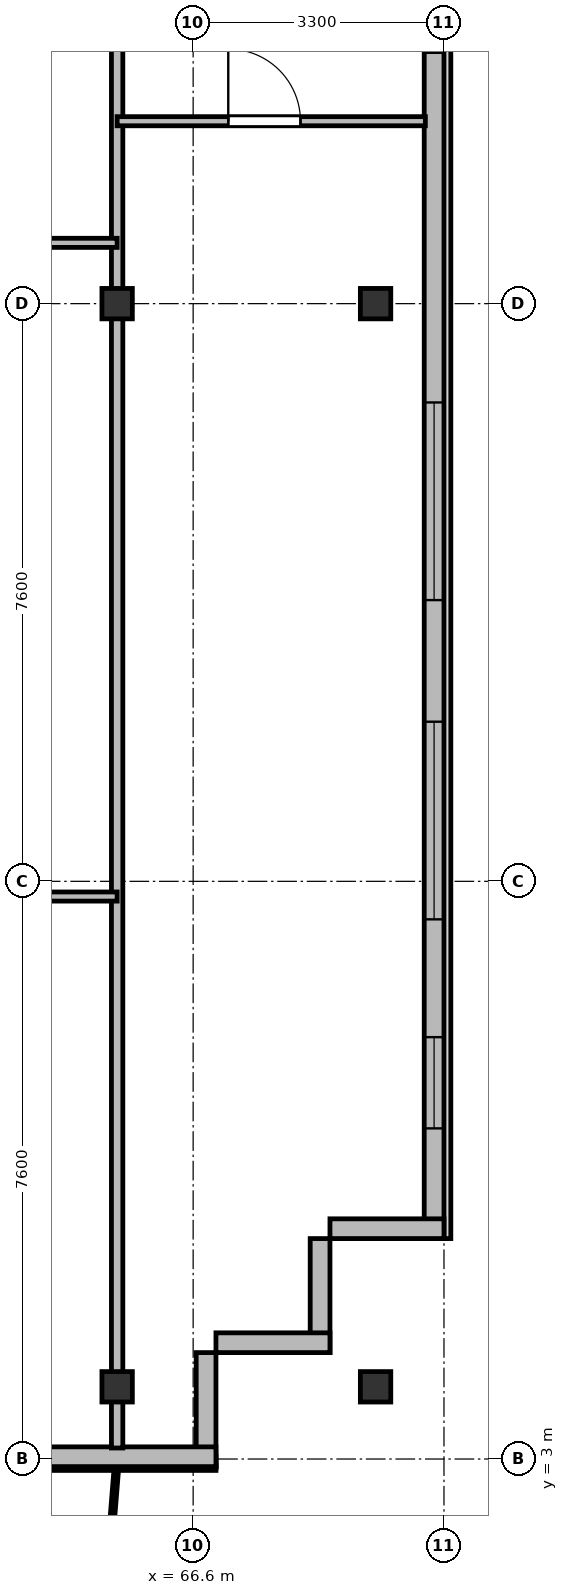
"""IFC4 building model, lengths in metres.
Left out: names, types, materials, properties, quantities, classifications, styles, units other than length and angle.
Written with IfcOpenShell. Run it as: python <this file> out.ifc"""

import sys

from ifc_helpers import new_model, si_unit, direction, frame, frame_2d, origin, origin_2d, place, context, subcontext, project, spatial, rectangle, i_section, extrude, source, transform, mapped, element, fill, save


model = new_model("IFC4")
c1 = context("Model", 3, precision=1e-05, world=origin(), true_north=direction((0.0, 1.0)))
c2 = subcontext(c1, "Body", "Model", "MODEL_VIEW")
j1 = project(units=[si_unit("LENGTHUNIT", "METRE"), si_unit("PLANEANGLEUNIT", "RADIAN")], contexts=[c1])
p1 = place(None, origin())
s1 = spatial("IfcSite", under=j1, at=p1, CompositionType="ELEMENT")
p2 = place(p1, origin())
s2 = spatial("IfcBuilding", under=s1, at=p2, CompositionType="ELEMENT")
p3 = place(p2, frame((0.0, 0.0, 110.5)))
s3 = spatial("IfcBuildingStorey", under=s2, at=p3, CompositionType="ELEMENT", Elevation=110.5)
m1 = source(origin(), c2, "Body", "SweptSolid", [
    extrude(i_section(OverallWidth=0.4, OverallDepth=0.4, WebThickness=0.022, FlangeThickness=0.035, at=origin_2d()), origin(), (0.0, 0.0, 1.0), 3.6),
])
for number, where, z_axis, x_axis in (
    (1, (65.6, 3.95, 0.0), (0.0, 0.0, 1.0), (1.0, 0.0, 0.0)),
    (2, (65.6, 18.2, 0.0), (0.0, 0.0, 1.0), (1.0, 0.0, 0.0)),
    (3, (69.0, 3.95, 0.0), (0.0, 0.0, 1.0), (1.0, 0.0, 0.0)),
    (4, (69.0, 18.2, 0.0), (0.0, 0.0, 1.0), (1.0, 0.0, 0.0)),
):
    element("IfcColumn", number, at=place(p3, frame(where, z_axis=z_axis, x_axis=x_axis)), inside=s3, PredefinedType="COLUMN", context=c2, shape_type="MappedRepresentation", body=[
        mapped(m1, transform((0.0, 0.0, 0.0), x_axis=(1.0, 0.0, 0.0), y_axis=(0.0, 1.0, 0.0), z_axis=(0.0, 0.0, 1.0), scale=1.0)),
    ])
p4 = place(p3, frame((69.77, 45.5, 0.0), z_axis=(0.0, 0.0, 1.0), x_axis=(0.0, -1.0, 0.0)))
e5 = element("IfcWall", 5, at=p4, inside=s3, PredefinedType="SOLIDWALL", context=c2, shape_type="SweptSolid", body=[
    extrude(rectangle(XDim=39.6, YDim=0.26, at=frame_2d((19.8, 0.0))), origin(), (0.0, 0.0, 1.0), 3.34),
])
p5 = place(p4, frame((36.95, 0.0, 0.92)))
e6 = element("IfcOpeningElement", 6, at=p5, cuts=e5, PredefinedType="OPENING", context=c2, shape_type="SweptSolid", body=[
    extrude(rectangle(XDim=1.2, YDim=1.65, at=frame_2d((0.6, 0.825))), frame((0.0, 0.14, 0.0), z_axis=(0.0, -1.0, 0.0), x_axis=(1.0, 0.0, 0.0)), (0.0, 0.0, 1.0), 0.28),
])
p6 = place(p4, frame((32.8, 0.0, 0.92)))
e7 = element("IfcOpeningElement", 7, at=p6, cuts=e5, PredefinedType="OPENING", context=c2, shape_type="SweptSolid", body=[
    extrude(rectangle(XDim=2.6, YDim=1.9, at=frame_2d((1.3, 0.95))), frame((0.0, 0.14, 0.0), z_axis=(0.0, -1.0, 0.0), x_axis=(1.0, 0.0, 0.0)), (0.0, 0.0, 1.0), 0.28),
])
p7 = place(p4, frame((28.6, 0.0, 0.92)))
e8 = element("IfcOpeningElement", 8, at=p7, cuts=e5, PredefinedType="OPENING", context=c2, shape_type="SweptSolid", body=[
    extrude(rectangle(XDim=2.6, YDim=1.9, at=frame_2d((1.3, 0.95))), frame((0.0, 0.14, 0.0), z_axis=(0.0, -1.0, 0.0), x_axis=(1.0, 0.0, 0.0)), (0.0, 0.0, 1.0), 0.28),
])
p8 = place(p4, frame((21.4, 0.0, 0.92)))
e9 = element("IfcOpeningElement", 9, at=p8, cuts=e5, PredefinedType="OPENING", context=c2, shape_type="SweptSolid", body=[
    extrude(rectangle(XDim=2.6, YDim=1.9, at=frame_2d((1.3, 0.95))), frame((0.0, 0.14, 0.0), z_axis=(0.0, -1.0, 0.0), x_axis=(1.0, 0.0, 0.0)), (0.0, 0.0, 1.0), 0.28),
])
p9 = place(p4, frame((7.4, 0.0, 0.92)))
e10 = element("IfcOpeningElement", 10, at=p9, cuts=e5, PredefinedType="OPENING", context=c2, shape_type="SweptSolid", body=[
    extrude(rectangle(XDim=2.6, YDim=1.9, at=frame_2d((1.3, 0.95))), frame((0.0, 0.14, 0.0), z_axis=(0.0, -1.0, 0.0), x_axis=(1.0, 0.0, 0.0)), (0.0, 0.0, 1.0), 0.28),
])
p10 = place(p4, frame((4.5, 0.0, 0.92)))
e11 = element("IfcOpeningElement", 11, at=p10, cuts=e5, PredefinedType="OPENING", context=c2, shape_type="SweptSolid", body=[
    extrude(rectangle(XDim=1.2, YDim=1.65, at=frame_2d((0.6, 0.825))), frame((0.0, 0.14, 0.0), z_axis=(0.0, -1.0, 0.0), x_axis=(1.0, 0.0, 0.0)), (0.0, 0.0, 1.0), 0.28),
])
p11 = place(p4, frame((1.15, 0.0, 0.92)))
e12 = element("IfcOpeningElement", 12, at=p11, cuts=e5, PredefinedType="OPENING", context=c2, shape_type="SweptSolid", body=[
    extrude(rectangle(XDim=1.2, YDim=1.65, at=frame_2d((0.6, 0.825))), frame((0.0, 0.14, 0.0), z_axis=(0.0, -1.0, 0.0), x_axis=(1.0, 0.0, 0.0)), (0.0, 0.0, 1.0), 0.28),
])
p12 = place(p3, frame((69.9, 6.03, 0.0), z_axis=(0.0, 0.0, 1.0), x_axis=(-1.0, 0.0, 0.0)))
e13 = element("IfcWall", 13, at=p12, inside=s3, PredefinedType="SOLIDWALL", context=c2, shape_type="SweptSolid", body=[
    extrude(rectangle(XDim=1.5, YDim=0.26, at=frame_2d((0.75, 0.0))), origin(), (0.0, 0.0, 1.0), 2.84),
])
for number, where, z_axis, x_axis in (
    (14, (68.27, 5.9, 0.0), (0.0, 0.0, 1.0), (0.0, -1.0, 0.0)),
    (15, (68.4, 4.53, 0.0), (0.0, 0.0, 1.0), (-1.0, 0.0, 0.0)),
):
    element("IfcWall", number, at=place(p3, frame(where, z_axis=z_axis, x_axis=x_axis)), inside=s3, PredefinedType="SOLIDWALL", context=c2, shape_type="SweptSolid", body=[
        extrude(rectangle(XDim=1.5, YDim=0.26, at=frame_2d((0.75, 0.0))), origin(), (0.0, 0.0, 1.0), 3.34),
    ])
p13 = place(p3, frame((66.77, 4.4, 0.0), z_axis=(0.0, 0.0, 1.0), x_axis=(0.0, -1.0, 0.0)))
e16 = element("IfcWall", 16, at=p13, inside=s3, PredefinedType="SOLIDWALL", context=c2, shape_type="SweptSolid", body=[
    extrude(rectangle(XDim=1.5, YDim=0.26, at=frame_2d((0.75, 0.0))), origin(), (0.0, 0.0, 1.0), 2.752),
])
p14 = place(p3, frame((66.9, 3.03, 0.0), z_axis=(0.0, 0.0, 1.0), x_axis=(-1.0, 0.0, 0.0)))
e17 = element("IfcWall", 17, at=p14, inside=s3, PredefinedType="SOLIDWALL", context=c2, shape_type="SweptSolid", body=[
    extrude(rectangle(XDim=59.4, YDim=0.26, at=frame_2d((29.7, 0.0))), origin(), (0.0, 0.0, 1.0), 3.34),
])
p15 = place(p14, frame((2.175, 0.0, 0.9)))
e18 = element("IfcOpeningElement", 18, at=p15, cuts=e17, PredefinedType="OPENING", context=c2, shape_type="SweptSolid", body=[
    extrude(rectangle(XDim=1.65, YDim=1.85, at=frame_2d((0.825, 0.925))), frame((0.0, 0.14, 0.0), z_axis=(0.0, -1.0, 0.0), x_axis=(1.0, 0.0, 0.0)), (0.0, 0.0, 1.0), 0.28),
])
p16 = place(p14, frame((5.5, 0.0, 0.9)))
e19 = element("IfcOpeningElement", 19, at=p16, cuts=e17, PredefinedType="OPENING", context=c2, shape_type="SweptSolid", body=[
    extrude(rectangle(XDim=1.8, YDim=1.8, at=frame_2d((0.9, 0.9))), frame((0.0, 0.14, 0.0), z_axis=(0.0, -1.0, 0.0), x_axis=(1.0, 0.0, 0.0)), (0.0, 0.0, 1.0), 0.28),
])
p17 = place(p14, frame((9.213, 0.0, 0.0)))
e20 = element("IfcOpeningElement", 20, at=p17, cuts=e17, PredefinedType="OPENING", context=c2, shape_type="SweptSolid", body=[
    extrude(rectangle(XDim=1.2, YDim=2.2, at=frame_2d((0.6, 1.1))), frame((0.0, 0.14, 0.0), z_axis=(0.0, -1.0, 0.0), x_axis=(1.0, 0.0, 0.0)), (0.0, 0.0, 1.0), 0.28),
])
p18 = place(p14, frame((13.15, 0.0, 0.9)))
e21 = element("IfcOpeningElement", 21, at=p18, cuts=e17, PredefinedType="OPENING", context=c2, shape_type="SweptSolid", body=[
    extrude(rectangle(XDim=1.5, YDim=1.75, at=frame_2d((0.75, 0.875))), frame((0.0, 0.14, 0.0), z_axis=(0.0, -1.0, 0.0), x_axis=(1.0, 0.0, 0.0)), (0.0, 0.0, 1.0), 0.28),
])
p19 = place(p14, frame((16.7, 0.0, 0.9)))
e22 = element("IfcOpeningElement", 22, at=p19, cuts=e17, PredefinedType="OPENING", context=c2, shape_type="SweptSolid", body=[
    extrude(rectangle(XDim=2.0, YDim=1.95, at=frame_2d((1.0, 0.975))), frame((0.0, 0.14, 0.0), z_axis=(0.0, -1.0, 0.0), x_axis=(1.0, 0.0, 0.0)), (0.0, 0.0, 1.0), 0.28),
])
p20 = place(p14, frame((20.475, 0.0, 0.9)))
e23 = element("IfcOpeningElement", 23, at=p20, cuts=e17, PredefinedType="OPENING", context=c2, shape_type="SweptSolid", body=[
    extrude(rectangle(XDim=1.65, YDim=1.85, at=frame_2d((0.825, 0.925))), frame((0.0, 0.14, 0.0), z_axis=(0.0, -1.0, 0.0), x_axis=(1.0, 0.0, 0.0)), (0.0, 0.0, 1.0), 0.28),
])
p21 = place(p14, frame((25.5, 0.0, 0.9)))
e24 = element("IfcOpeningElement", 24, at=p21, cuts=e17, PredefinedType="OPENING", context=c2, shape_type="SweptSolid", body=[
    extrude(rectangle(XDim=1.8, YDim=1.8, at=frame_2d((0.9, 0.9))), frame((0.0, 0.14, 0.0), z_axis=(0.0, -1.0, 0.0), x_axis=(1.0, 0.0, 0.0)), (0.0, 0.0, 1.0), 0.28),
])
p22 = place(p14, frame((31.9, 0.0, 0.9)))
e25 = element("IfcOpeningElement", 25, at=p22, cuts=e17, PredefinedType="OPENING", context=c2, shape_type="SweptSolid", body=[
    extrude(rectangle(XDim=2.2, YDim=1.8, at=frame_2d((1.1, 0.9))), frame((0.0, 0.14, 0.0), z_axis=(0.0, -1.0, 0.0), x_axis=(1.0, 0.0, 0.0)), (0.0, 0.0, 1.0), 0.28),
])
p23 = place(p14, frame((37.584, 0.0, 0.0)))
e26 = element("IfcOpeningElement", 26, at=p23, cuts=e17, PredefinedType="OPENING", context=c2, shape_type="SweptSolid", body=[
    extrude(rectangle(XDim=1.2, YDim=2.2, at=frame_2d((0.6, 1.1))), frame((0.0, 0.14, 0.0), z_axis=(0.0, -1.0, 0.0), x_axis=(1.0, 0.0, 0.0)), (0.0, 0.0, 1.0), 0.28),
])
p24 = place(p14, frame((40.6, 0.0, 0.9)))
e27 = element("IfcOpeningElement", 27, at=p24, cuts=e17, PredefinedType="OPENING", context=c2, shape_type="SweptSolid", body=[
    extrude(rectangle(XDim=2.0, YDim=1.95, at=frame_2d((1.0, 0.975))), frame((0.0, 0.14, 0.0), z_axis=(0.0, -1.0, 0.0), x_axis=(1.0, 0.0, 0.0)), (0.0, 0.0, 1.0), 0.28),
])
p25 = place(p14, frame((46.575, 0.0, 0.9)))
e28 = element("IfcOpeningElement", 28, at=p25, cuts=e17, PredefinedType="OPENING", context=c2, shape_type="SweptSolid", body=[
    extrude(rectangle(XDim=1.65, YDim=1.85, at=frame_2d((0.825, 0.925))), frame((0.0, 0.14, 0.0), z_axis=(0.0, -1.0, 0.0), x_axis=(1.0, 0.0, 0.0)), (0.0, 0.0, 1.0), 0.28),
])
p26 = place(p14, frame((55.817, 0.0, 0.0)))
e29 = element("IfcOpeningElement", 29, at=p26, cuts=e17, PredefinedType="OPENING", context=c2, shape_type="SweptSolid", body=[
    extrude(rectangle(XDim=1.2, YDim=2.2, at=frame_2d((0.6, 1.1))), frame((0.0, 0.14, 0.0), z_axis=(0.0, -1.0, 0.0), x_axis=(1.0, 0.0, 0.0)), (0.0, 0.0, 1.0), 0.28),
])
p27 = place(p3, frame((65.6, 3.145, 0.0), z_axis=(0.0, 0.0, 1.0), x_axis=(0.0, 1.0, 0.0)))
e30 = element("IfcWall", 30, at=p27, inside=s3, PredefinedType="PARTITIONING", context=c2, shape_type="SweptSolid", body=[
    extrude(rectangle(XDim=24.455, YDim=0.15, at=frame_2d((12.228, 0.0))), origin(), (0.0, 0.0, 1.0), 2.84),
])
p28 = place(p3, frame((58.8, 19.0, 0.0), z_axis=(0.0, 0.0, 1.0), x_axis=(1.0, 0.0, 0.0)))
e31 = element("IfcWall", 31, at=p28, inside=s3, PredefinedType="PARTITIONING", context=c2, shape_type="SweptSolid", body=[
    extrude(rectangle(XDim=6.8, YDim=0.12, at=frame_2d((3.4, 0.0))), origin(), (0.0, 0.0, 1.0), 2.84),
])
p29 = place(p28, frame((2.925, 0.0, 0.0)))
e32 = element("IfcOpeningElement", 32, at=p29, cuts=e31, PredefinedType="OPENING", context=c2, shape_type="SweptSolid", body=[
    extrude(rectangle(XDim=0.95, YDim=2.15, at=frame_2d((0.475, 1.075))), frame((0.0, 0.07, 0.0), z_axis=(0.0, -1.0, 0.0), x_axis=(1.0, 0.0, 0.0)), (0.0, 0.0, 1.0), 0.14),
])
p30 = place(p3, frame((62.2, 10.4, 0.0), z_axis=(0.0, 0.0, 1.0), x_axis=(1.0, 0.0, 0.0)))
e33 = element("IfcWall", 33, at=p30, inside=s3, PredefinedType="PARTITIONING", context=c2, shape_type="SweptSolid", body=[
    extrude(rectangle(XDim=3.4, YDim=0.12, at=frame_2d((1.7, 0.0))), origin(), (0.0, 0.0, 1.0), 2.84),
])
p31 = place(p30, frame((1.131, 0.0, 0.0)))
e34 = element("IfcOpeningElement", 34, at=p31, cuts=e33, PredefinedType="OPENING", context=c2, shape_type="SweptSolid", body=[
    extrude(rectangle(XDim=0.95, YDim=2.15, at=frame_2d((0.475, 1.075))), frame((0.0, 0.07, 0.0), z_axis=(0.0, -1.0, 0.0), x_axis=(1.0, 0.0, 0.0)), (0.0, 0.0, 1.0), 0.14),
])
p32 = place(p3, frame((65.6, 20.6, 0.0), z_axis=(0.0, 0.0, 1.0), x_axis=(1.0, 0.0, 0.0)))
e35 = element("IfcWall", 35, at=p32, inside=s3, PredefinedType="PARTITIONING", context=c2, shape_type="SweptSolid", body=[
    extrude(rectangle(XDim=4.055, YDim=0.12, at=frame_2d((2.027, 0.0))), origin(), (0.0, 0.0, 1.0), 2.84),
])
p33 = place(p32, frame((1.462, 0.0, 0.0)))
e36 = element("IfcOpeningElement", 36, at=p33, cuts=e35, PredefinedType="OPENING", context=c2, shape_type="SweptSolid", body=[
    extrude(rectangle(XDim=0.95, YDim=2.15, at=frame_2d((0.475, 1.075))), frame((0.0, 0.07, 0.0), z_axis=(0.0, -1.0, 0.0), x_axis=(1.0, 0.0, 0.0)), (0.0, 0.0, 1.0), 0.14),
])
m2 = source(origin(), c2, "Body", "SweptSolid", [
    extrude(rectangle(XDim=1.2, YDim=1.65, at=frame_2d((0.6, 0.825))), frame((0.0, 0.03, 0.0), z_axis=(0.0, -1.0, 0.0), x_axis=(1.0, 0.0, 0.0)), (0.0, 0.0, 1.0), 0.06),
])
p34 = place(p5, origin())
e37 = element("IfcWindow", 37, at=p34, inside=s3, PartitioningType="SINGLE_PANEL", PredefinedType="WINDOW", context=c2, shape_type="MappedRepresentation", body=[
    mapped(m2, transform((0.0, 0.0, 0.0), x_axis=(1.0, 0.0, 0.0), y_axis=(0.0, 1.0, 0.0), z_axis=(0.0, 0.0, 1.0), scale=1.0)),
])
fill(e6, e37)
m3 = source(origin(), c2, "Body", "SweptSolid", [
    extrude(rectangle(XDim=2.6, YDim=1.9, at=frame_2d((1.3, 0.95))), frame((0.0, 0.03, 0.0), z_axis=(0.0, -1.0, 0.0), x_axis=(1.0, 0.0, 0.0)), (0.0, 0.0, 1.0), 0.06),
])
p35 = place(p6, origin())
e38 = element("IfcWindow", 38, at=p35, inside=s3, PartitioningType="SINGLE_PANEL", PredefinedType="WINDOW", context=c2, shape_type="MappedRepresentation", body=[
    mapped(m3, transform((0.0, 0.0, 0.0), x_axis=(1.0, 0.0, 0.0), y_axis=(0.0, 1.0, 0.0), z_axis=(0.0, 0.0, 1.0), scale=1.0)),
])
fill(e7, e38)
p36 = place(p7, origin())
e39 = element("IfcWindow", 39, at=p36, inside=s3, PartitioningType="SINGLE_PANEL", PredefinedType="WINDOW", context=c2, shape_type="MappedRepresentation", body=[
    mapped(m3, transform((0.0, 0.0, 0.0), x_axis=(1.0, 0.0, 0.0), y_axis=(0.0, 1.0, 0.0), z_axis=(0.0, 0.0, 1.0), scale=1.0)),
])
fill(e8, e39)
m4 = source(origin(), c2, "Body", "SweptSolid", [
    extrude(rectangle(XDim=0.95, YDim=2.15, at=frame_2d((0.475, 1.075))), frame((0.0, 0.025, 0.0), z_axis=(0.0, -1.0, 0.0), x_axis=(1.0, 0.0, 0.0)), (0.0, 0.0, 1.0), 0.05),
])
p37 = place(p33, origin())
e40 = element("IfcDoor", 40, at=p37, inside=s3, OperationType="SINGLE_SWING_LEFT", PredefinedType="DOOR", context=c2, shape_type="MappedRepresentation", body=[
    mapped(m4, transform((0.0, 0.0, 0.0), x_axis=(1.0, 0.0, 0.0), y_axis=(0.0, 1.0, 0.0), z_axis=(0.0, 0.0, 1.0), scale=1.0)),
])
fill(e36, e40)
save(model, sys.argv[1])
